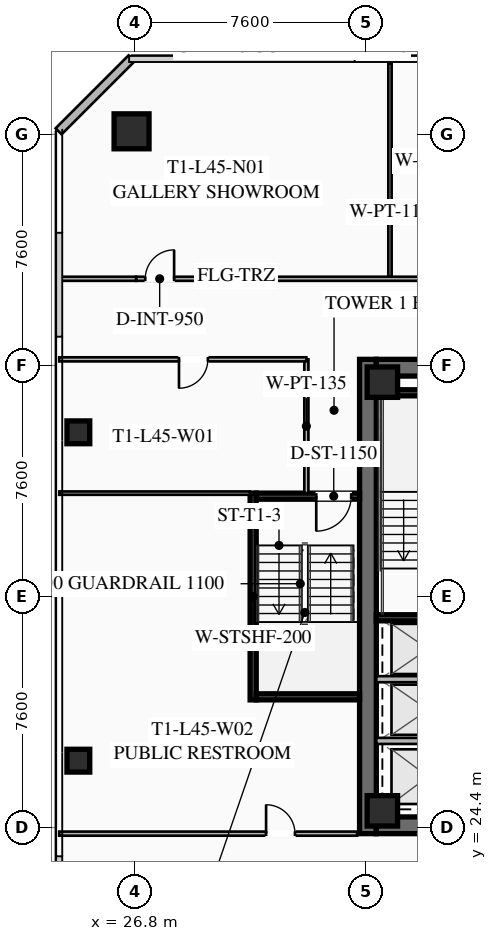
"""IFC4 building model, lengths in metres.
Left out: names, types, materials, properties, quantities, classifications, styles, units other than length and angle.
Written with IfcOpenShell. Run it as: python <this file> out.ifc"""

import sys

from ifc_helpers import new_model, si_unit, direction, frame, frame_2d, origin, origin_2d, place, context, subcontext, project, spatial, rectangle, hollow_rectangle, extrude, element, fill, save


model = new_model("IFC4")
c1 = context("Model", 3, precision=1e-05, world=origin(), true_north=direction((0.0, 1.0)))
c2 = subcontext(c1, "Body", "Model", "MODEL_VIEW")
j1 = project(units=[si_unit("LENGTHUNIT", "METRE"), si_unit("PLANEANGLEUNIT", "RADIAN")], contexts=[c1])
p1 = place(None, origin())
s1 = spatial("IfcSite", under=j1, at=p1, CompositionType="ELEMENT")
p2 = place(p1, origin())
s2 = spatial("IfcBuilding", under=s1, at=p2, CompositionType="ELEMENT")
p3 = place(p2, frame((0.0, 0.0, 167.65)))
s3 = spatial("IfcBuildingStorey", under=s2, at=p3, CompositionType="ELEMENT", Elevation=167.65)
p4 = place(p3, frame((34.475, 24.2, 0.0), z_axis=(0.0, 0.0, 1.0), x_axis=(0.0, 1.0, 0.0)))
e1 = element("IfcWall", 1, at=p4, inside=s3, PredefinedType="SHEAR", context=c2, shape_type="SweptSolid", body=[
    extrude(rectangle(XDim=15.6, YDim=0.55, at=frame_2d((7.8, 0.0))), origin(), (0.0, 0.0, 1.0), 3.55),
])
p5 = place(p3, frame((49.25, 24.475, 0.0), z_axis=(0.0, 0.0, 1.0), x_axis=(-1.0, 0.0, 0.0)))
e2 = element("IfcWall", 2, at=p5, inside=s3, PredefinedType="SHEAR", context=c2, shape_type="SweptSolid", body=[
    extrude(rectangle(XDim=14.5, YDim=0.55, at=frame_2d((7.25, 0.0))), origin(), (0.0, 0.0, 1.0), 3.55),
])
p6 = place(p5, frame((8.95, 0.0, 0.0)))
e3 = element("IfcOpeningElement", 3, at=p6, cuts=e2, PredefinedType="OPENING", context=c2, shape_type="SweptSolid", body=[
    extrude(rectangle(XDim=1.25, YDim=2.25, at=frame_2d((0.625, 1.125))), frame((0.0, 0.285, 0.0), z_axis=(0.0, -1.0, 0.0), x_axis=(1.0, 0.0, 0.0)), (0.0, 0.0, 1.0), 0.57),
])
p7 = place(p5, frame((3.9, 0.0, 0.0)))
e4 = element("IfcOpeningElement", 4, at=p7, cuts=e2, PredefinedType="OPENING", context=c2, shape_type="SweptSolid", body=[
    extrude(rectangle(XDim=1.25, YDim=2.25, at=frame_2d((0.625, 1.125))), frame((0.0, 0.285, 0.0), z_axis=(0.0, -1.0, 0.0), x_axis=(1.0, 0.0, 0.0)), (0.0, 0.0, 1.0), 0.57),
])
p8 = place(p3, frame((34.75, 39.525, 0.0), z_axis=(0.0, 0.0, 1.0), x_axis=(1.0, 0.0, 0.0)))
e5 = element("IfcWall", 5, at=p8, inside=s3, PredefinedType="SHEAR", context=c2, shape_type="SweptSolid", body=[
    extrude(rectangle(XDim=14.5, YDim=0.55, at=frame_2d((7.25, 0.0))), origin(), (0.0, 0.0, 1.0), 3.55),
])
p9 = place(p8, frame((4.3, 0.0, 0.0)))
e6 = element("IfcOpeningElement", 6, at=p9, cuts=e5, PredefinedType="OPENING", context=c2, shape_type="SweptSolid", body=[
    extrude(rectangle(XDim=1.25, YDim=2.25, at=frame_2d((0.625, 1.125))), frame((0.0, 0.285, 0.0), z_axis=(0.0, -1.0, 0.0), x_axis=(1.0, 0.0, 0.0)), (0.0, 0.0, 1.0), 0.57),
])
p10 = place(p8, frame((9.35, 0.0, 0.0)))
e7 = element("IfcOpeningElement", 7, at=p10, cuts=e5, PredefinedType="OPENING", context=c2, shape_type="SweptSolid", body=[
    extrude(rectangle(XDim=1.25, YDim=2.25, at=frame_2d((0.625, 1.125))), frame((0.0, 0.285, 0.0), z_axis=(0.0, -1.0, 0.0), x_axis=(1.0, 0.0, 0.0)), (0.0, 0.0, 1.0), 0.57),
])
for number, where, z_axis, x_axis in (
    (8, (34.95, 24.95, 0.0), (0.0, 0.0, 1.0), (1.0, 0.0, 0.0)),
    (9, (34.95, 39.05, 0.0), (0.0, 0.0, 1.0), (1.0, 0.0, 0.0)),
):
    element("IfcColumn", number, at=place(p3, frame(where, z_axis=z_axis, x_axis=x_axis)), inside=s3, PredefinedType="COLUMN", context=c2, shape_type="SweptSolid", body=[
        extrude(hollow_rectangle(XDim=1.0, YDim=1.0, WallThickness=0.04, at=origin_2d()), origin(), (0.0, 0.0, 1.0), 3.37),
    ])
p11 = place(p3, frame((26.7, 47.3, 0.0), z_axis=(0.0, 0.0, 1.0), x_axis=(1.0, 0.0, 0.0)))
e10 = element("IfcColumn", 10, at=p11, inside=s3, PredefinedType="COLUMN", context=c2, shape_type="SweptSolid", body=[
    extrude(hollow_rectangle(XDim=1.15, YDim=1.15, WallThickness=0.045, at=origin_2d()), origin(), (0.0, 0.0, 1.0), 3.37),
])
for number, where, z_axis, x_axis in (
    (11, (24.95, 37.4, 0.0), (0.0, 0.0, 1.0), (1.0, 0.0, 0.0)),
    (12, (24.95, 26.6, 0.0), (0.0, 0.0, 1.0), (1.0, 0.0, 0.0)),
):
    element("IfcColumn", number, at=place(p3, frame(where, z_axis=z_axis, x_axis=x_axis)), inside=s3, PredefinedType="COLUMN", context=c2, shape_type="SweptSolid", body=[
        extrude(hollow_rectangle(XDim=0.75, YDim=0.75, WallThickness=0.032, at=origin_2d()), origin(), (0.0, 0.0, 1.0), 3.37),
    ])
p12 = place(p3, frame((24.3, 47.3, 0.0), z_axis=(0.0, 0.0, 1.0), x_axis=(0.707106781187, 0.707106781187, 0.0)))
e13 = element("IfcWall", 13, at=p12, inside=s3, PredefinedType="SOLIDWALL", context=c2, shape_type="SweptSolid", body=[
    extrude(rectangle(XDim=3.394, YDim=0.28, at=frame_2d((1.697, 0.0))), origin(), (0.0, 0.0, 1.0), 3.37),
])
for number, where, z_axis, x_axis in (
    (14, (34.75, 31.3, 0.0), (0.0, 0.0, 1.0), (1.0, 0.0, 0.0)),
    (15, (34.75, 38.7, 0.0), (0.0, 0.0, 1.0), (1.0, 0.0, 0.0)),
):
    element("IfcWall", number, at=place(p3, frame(where, z_axis=z_axis, x_axis=x_axis)), inside=s3, PredefinedType="SHEAR", context=c2, shape_type="SweptSolid", body=[
        extrude(rectangle(XDim=3.55, YDim=0.2, at=frame_2d((1.775, 0.0))), origin(), (0.0, 0.0, 1.0), 3.37),
    ])
for number, where, z_axis, x_axis in (
    (16, (34.75, 27.25, 0.0), (0.0, 0.0, 1.0), (1.0, 0.0, 0.0)),
    (17, (34.75, 29.28, 0.0), (0.0, 0.0, 1.0), (1.0, 0.0, 0.0)),
):
    element("IfcWall", number, at=place(p3, frame(where, z_axis=z_axis, x_axis=x_axis)), inside=s3, PredefinedType="SOLIDWALL", context=c2, shape_type="SweptSolid", body=[
        extrude(rectangle(XDim=3.2, YDim=0.2, at=frame_2d((1.6, 0.0))), origin(), (0.0, 0.0, 1.0), 3.37),
    ])
p13 = place(p3, frame((30.7, 28.6, 0.0), z_axis=(0.0, 0.0, 1.0), x_axis=(0.0, 1.0, 0.0)))
e18 = element("IfcWall", 18, at=p13, inside=s3, PredefinedType="SHEAR", context=c2, shape_type="SweptSolid", body=[
    extrude(rectangle(XDim=6.8, YDim=0.2, at=frame_2d((3.4, 0.0))), origin(), (0.0, 0.0, 1.0), 3.37),
])
p14 = place(p3, frame((34.2, 35.3, 0.0), z_axis=(0.0, 0.0, 1.0), x_axis=(-1.0, 0.0, 0.0)))
e19 = element("IfcWall", 19, at=p14, inside=s3, PredefinedType="SHEAR", context=c2, shape_type="SweptSolid", body=[
    extrude(rectangle(XDim=3.4, YDim=0.2, at=frame_2d((1.7, 0.0))), origin(), (0.0, 0.0, 1.0), 3.37),
])
p15 = place(p14, frame((0.275, 0.0, 0.0)))
e20 = element("IfcOpeningElement", 20, at=p15, cuts=e19, PredefinedType="OPENING", context=c2, shape_type="SweptSolid", body=[
    extrude(rectangle(XDim=1.15, YDim=2.2, at=frame_2d((0.575, 1.1))), frame((0.0, 0.11, 0.0), z_axis=(0.0, -1.0, 0.0), x_axis=(1.0, 0.0, 0.0)), (0.0, 0.0, 1.0), 0.22),
])
p16 = place(p3, frame((30.8, 28.7, 0.0), z_axis=(0.0, 0.0, 1.0), x_axis=(1.0, 0.0, 0.0)))
e21 = element("IfcWall", 21, at=p16, inside=s3, PredefinedType="SHEAR", context=c2, shape_type="SweptSolid", body=[
    extrude(rectangle(XDim=3.4, YDim=0.2, at=frame_2d((1.7, 0.0))), origin(), (0.0, 0.0, 1.0), 3.37),
])
p17 = place(p3, frame((32.45, 35.4, 0.0), z_axis=(0.0, 0.0, 1.0), x_axis=(0.0, 1.0, 0.0)))
e22 = element("IfcWall", 22, at=p17, inside=s3, PredefinedType="PARTITIONING", context=c2, shape_type="SweptSolid", body=[
    extrude(rectangle(XDim=4.4, YDim=0.135, at=frame_2d((2.2, 0.0))), origin(), (0.0, 0.0, 1.0), 2.723),
])
p18 = place(p3, frame((26.85, 42.45, 0.0), z_axis=(0.0, 0.0, 1.0), x_axis=(1.0, 0.0, 0.0)))
e23 = element("IfcWall", 23, at=p18, inside=s3, PredefinedType="PARTITIONING", context=c2, shape_type="SweptSolid", body=[
    extrude(rectangle(XDim=30.3, YDim=0.135, at=frame_2d((15.15, 0.0))), origin(), (0.0, 0.0, 1.0), 2.723),
])
p19 = place(p18, frame((0.3, 0.0, 0.0)))
e24 = element("IfcOpeningElement", 24, at=p19, cuts=e23, PredefinedType="OPENING", context=c2, shape_type="SweptSolid", body=[
    extrude(rectangle(XDim=0.95, YDim=2.05, at=frame_2d((0.475, 1.025))), frame((0.0, 0.077, 0.0), z_axis=(0.0, -1.0, 0.0), x_axis=(1.0, 0.0, 0.0)), (0.0, 0.0, 1.0), 0.155),
])
p20 = place(p18, frame((14.929, 0.0, 0.0)))
e25 = element("IfcOpeningElement", 25, at=p20, cuts=e23, PredefinedType="OPENING", context=c2, shape_type="SweptSolid", body=[
    extrude(rectangle(XDim=0.95, YDim=2.05, at=frame_2d((0.475, 1.025))), frame((0.0, 0.077, 0.0), z_axis=(0.0, -1.0, 0.0), x_axis=(1.0, 0.0, 0.0)), (0.0, 0.0, 1.0), 0.155),
])
p21 = place(p18, frame((18.735, 0.0, 0.0)))
e26 = element("IfcOpeningElement", 26, at=p21, cuts=e23, PredefinedType="OPENING", context=c2, shape_type="SweptSolid", body=[
    extrude(rectangle(XDim=0.95, YDim=2.05, at=frame_2d((0.475, 1.025))), frame((0.0, 0.077, 0.0), z_axis=(0.0, -1.0, 0.0), x_axis=(1.0, 0.0, 0.0)), (0.0, 0.0, 1.0), 0.155),
])
p22 = place(p18, frame((29.05, 0.0, 0.0)))
e27 = element("IfcOpeningElement", 27, at=p22, cuts=e23, PredefinedType="OPENING", context=c2, shape_type="SweptSolid", body=[
    extrude(rectangle(XDim=0.95, YDim=2.05, at=frame_2d((0.475, 1.025))), frame((0.0, 0.077, 0.0), z_axis=(0.0, -1.0, 0.0), x_axis=(1.0, 0.0, 0.0)), (0.0, 0.0, 1.0), 0.155),
])
p23 = place(p3, frame((24.32, 42.45, 0.0), z_axis=(0.0, 0.0, 1.0), x_axis=(1.0, 0.0, 0.0)))
e28 = element("IfcWall", 28, at=p23, inside=s3, PredefinedType="PARTITIONING", context=c2, shape_type="SweptSolid", body=[
    extrude(rectangle(XDim=2.53, YDim=0.135, at=frame_2d((1.265, 0.0))), origin(), (0.0, 0.0, 1.0), 2.723),
])
p24 = place(p3, frame((35.2, 42.53, 0.0), z_axis=(0.0, 0.0, 1.0), x_axis=(0.0, 1.0, 0.0)))
e29 = element("IfcWall", 29, at=p24, inside=s3, PredefinedType="PARTITIONING", context=c2, shape_type="SweptSolid", body=[
    extrude(rectangle(XDim=7.0, YDim=0.11, at=frame_2d((3.5, 0.0))), origin(), (0.0, 0.0, 1.0), 2.723),
])
p25 = place(p3, frame((32.45, 39.8, 0.0), z_axis=(0.0, 0.0, 1.0), x_axis=(-1.0, 0.0, 0.0)))
e30 = element("IfcWall", 30, at=p25, inside=s3, PredefinedType="PARTITIONING", context=c2, shape_type="SweptSolid", body=[
    extrude(rectangle(XDim=8.13, YDim=0.135, at=frame_2d((4.065, 0.0))), origin(), (0.0, 0.0, 1.0), 2.723),
])
p26 = place(p25, frame((3.24, 0.0, 0.0)))
e31 = element("IfcOpeningElement", 31, at=p26, cuts=e30, PredefinedType="OPENING", context=c2, shape_type="SweptSolid", body=[
    extrude(rectangle(XDim=0.95, YDim=2.05, at=frame_2d((0.475, 1.025))), frame((0.0, 0.077, 0.0), z_axis=(0.0, -1.0, 0.0), x_axis=(1.0, 0.0, 0.0)), (0.0, 0.0, 1.0), 0.155),
])
p27 = place(p3, frame((24.32, 24.2, 0.0), z_axis=(0.0, 0.0, 1.0), x_axis=(1.0, 0.0, 0.0)))
e32 = element("IfcWall", 32, at=p27, inside=s3, PredefinedType="PARTITIONING", context=c2, shape_type="SweptSolid", body=[
    extrude(rectangle(XDim=9.8, YDim=0.135, at=frame_2d((4.9, 0.0))), origin(), (0.0, 0.0, 1.0), 2.723),
])
p28 = place(p27, frame((6.805, 0.0, 0.0)))
e33 = element("IfcOpeningElement", 33, at=p28, cuts=e32, PredefinedType="OPENING", context=c2, shape_type="SweptSolid", body=[
    extrude(rectangle(XDim=0.95, YDim=2.05, at=frame_2d((0.475, 1.025))), frame((0.0, 0.077, 0.0), z_axis=(0.0, -1.0, 0.0), x_axis=(1.0, 0.0, 0.0)), (0.0, 0.0, 1.0), 0.155),
])
p29 = place(p3, frame((30.6, 35.4, 0.0), z_axis=(0.0, 0.0, 1.0), x_axis=(-1.0, 0.0, 0.0)))
e34 = element("IfcWall", 34, at=p29, inside=s3, PredefinedType="PARTITIONING", context=c2, shape_type="SweptSolid", body=[
    extrude(rectangle(XDim=6.28, YDim=0.11, at=frame_2d((3.14, 0.0))), origin(), (0.0, 0.0, 1.0), 2.723),
])
p30 = place(p15, origin())
e35 = element("IfcDoor", 35, at=p30, inside=s3, OperationType="SINGLE_SWING_RIGHT", PredefinedType="DOOR", context=c2, shape_type="SweptSolid", body=[
    extrude(rectangle(XDim=1.15, YDim=2.2, at=frame_2d((0.575, 1.1))), frame((0.0, 0.025, 0.0), z_axis=(0.0, -1.0, 0.0), x_axis=(1.0, 0.0, 0.0)), (0.0, 0.0, 1.0), 0.05),
])
fill(e20, e35)
p31 = place(p19, origin())
e36 = element("IfcDoor", 36, at=p31, inside=s3, OperationType="SINGLE_SWING_RIGHT", PredefinedType="DOOR", context=c2, shape_type="SweptSolid", body=[
    extrude(rectangle(XDim=0.95, YDim=2.05, at=frame_2d((0.475, 1.025))), frame((0.0, 0.025, 0.0), z_axis=(0.0, -1.0, 0.0), x_axis=(1.0, 0.0, 0.0)), (0.0, 0.0, 1.0), 0.05),
])
fill(e24, e36)
p32 = place(p26, origin())
e37 = element("IfcDoor", 37, at=p32, inside=s3, OperationType="SINGLE_SWING_RIGHT", PredefinedType="DOOR", context=c2, shape_type="SweptSolid", body=[
    extrude(rectangle(XDim=0.95, YDim=2.05, at=frame_2d((0.475, 1.025))), frame((0.0, 0.025, 0.0), z_axis=(0.0, -1.0, 0.0), x_axis=(1.0, 0.0, 0.0)), (0.0, 0.0, 1.0), 0.05),
])
fill(e31, e37)
p33 = place(p28, origin())
e38 = element("IfcDoor", 38, at=p33, inside=s3, OperationType="SINGLE_SWING_LEFT", PredefinedType="DOOR", context=c2, shape_type="SweptSolid", body=[
    extrude(rectangle(XDim=0.95, YDim=2.05, at=frame_2d((0.475, 1.025))), frame((0.0, 0.025, 0.0), z_axis=(0.0, -1.0, 0.0), x_axis=(1.0, 0.0, 0.0)), (0.0, 0.0, 1.0), 0.05),
])
fill(e33, e38)
save(model, sys.argv[1])
